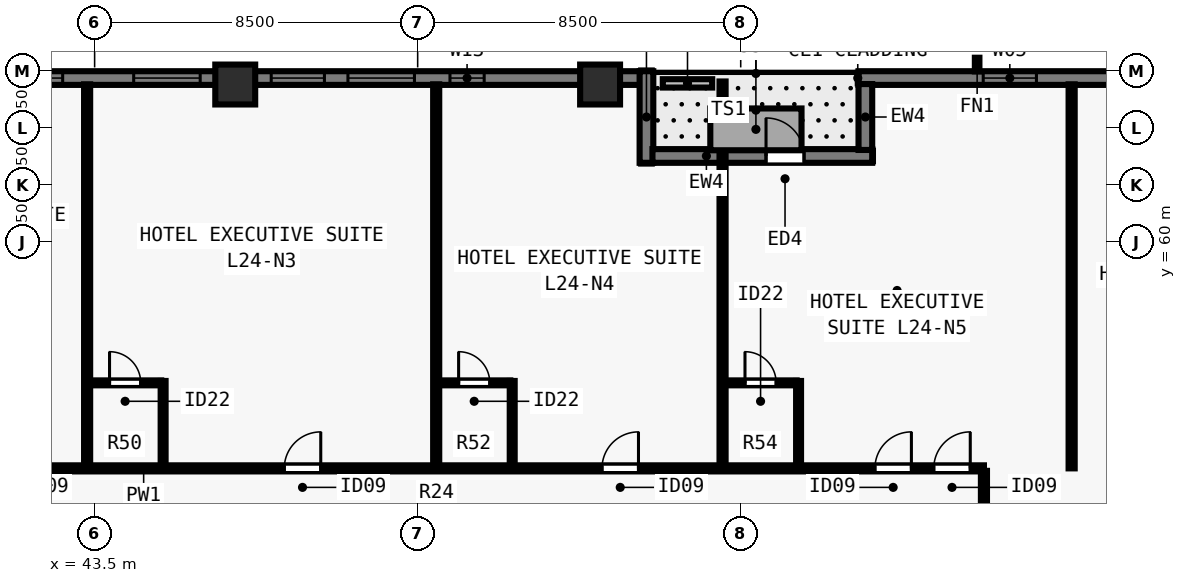
"""IFC4 building model, lengths in metres.
Left out: names, types, materials, properties, quantities, classifications, styles, units other than length and angle.
Written with IfcOpenShell. Run it as: python <this file> out.ifc"""

import sys

from ifc_helpers import new_model, si_unit, direction, frame, frame_2d, origin, origin_2d, place, context, subcontext, project, spatial, rectangle, extrude, element, fill, save


model = new_model("IFC4")
c1 = context("Model", 3, precision=1e-05, world=origin(), true_north=direction((0.0, 1.0)))
c2 = subcontext(c1, "Body", "Model", "MODEL_VIEW")
j1 = project(units=[si_unit("LENGTHUNIT", "METRE"), si_unit("PLANEANGLEUNIT", "RADIAN")], contexts=[c1])
p1 = place(None, origin())
s1 = spatial("IfcSite", under=j1, at=p1, CompositionType="ELEMENT")
p2 = place(p1, origin())
s2 = spatial("IfcBuilding", under=s1, at=p2, CompositionType="ELEMENT")
p3 = place(p2, frame((0.0, 0.0, 90.0)))
s3 = spatial("IfcBuildingStorey", under=s2, at=p3, CompositionType="ELEMENT", Elevation=90.0)
for number, where, z_axis, x_axis in (
    (1, (56.8, 64.15, 0.0), (0.0, 0.0, 1.0), (1.0, 0.0, 0.0)),
    (2, (47.2, 64.15, 0.0), (0.0, 0.0, 1.0), (1.0, 0.0, 0.0)),
):
    element("IfcColumn", number, at=place(p3, frame(where, z_axis=z_axis, x_axis=x_axis)), inside=s3, PredefinedType="COLUMN", context=c2, shape_type="SweptSolid", body=[
        extrude(rectangle(XDim=1.05, YDim=1.05, at=origin_2d()), origin(), (0.0, 0.0, 1.0), 3.5),
    ])
p4 = place(p3, frame((63.6, 64.32, 0.0), z_axis=(0.0, 0.0, 1.0), x_axis=(1.0, 0.0, 0.0)))
e3 = element("IfcWall", 3, at=p4, inside=s3, PredefinedType="SOLIDWALL", context=c2, shape_type="SweptSolid", body=[
    extrude(rectangle(XDim=10.562, YDim=0.36, at=frame_2d((5.281, 0.0))), origin(), (0.0, 0.0, 1.0), 3.28),
])
p5 = place(p4, frame((3.281, 0.0, 0.8)))
e4 = element("IfcOpeningElement", 4, at=p5, cuts=e3, PredefinedType="OPENING", context=c2, shape_type="SweptSolid", body=[
    extrude(rectangle(XDim=1.4, YDim=1.544, at=frame_2d((0.7, 0.772))), frame((0.0, 0.19, 0.0), z_axis=(0.0, -1.0, 0.0), x_axis=(1.0, 0.0, 0.0)), (0.0, 0.0, 1.0), 0.38),
])
p6 = place(p3, frame((29.5, 64.32, 0.0), z_axis=(0.0, 0.0, 1.0), x_axis=(1.0, 0.0, 0.0)))
e5 = element("IfcWall", 5, at=p6, inside=s3, PredefinedType="SOLIDWALL", context=c2, shape_type="SweptSolid", body=[
    extrude(rectangle(XDim=28.362, YDim=0.36, at=frame_2d((14.181, 0.0))), origin(), (0.0, 0.0, 1.0), 3.28),
])
p7 = place(p6, frame((4.422, 0.0, 0.8)))
e6 = element("IfcOpeningElement", 6, at=p7, cuts=e5, PredefinedType="OPENING", context=c2, shape_type="SweptSolid", body=[
    extrude(rectangle(XDim=1.4, YDim=1.544, at=frame_2d((0.7, 0.772))), frame((0.0, 0.19, 0.0), z_axis=(0.0, -1.0, 0.0), x_axis=(1.0, 0.0, 0.0)), (0.0, 0.0, 1.0), 0.38),
])
p8 = place(p6, frame((8.14, 0.0, 0.8)))
e7 = element("IfcOpeningElement", 7, at=p8, cuts=e5, PredefinedType="OPENING", context=c2, shape_type="SweptSolid", body=[
    extrude(rectangle(XDim=1.75, YDim=1.544, at=frame_2d((0.875, 0.772))), frame((0.0, 0.19, 0.0), z_axis=(0.0, -1.0, 0.0), x_axis=(1.0, 0.0, 0.0)), (0.0, 0.0, 1.0), 0.38),
])
p9 = place(p6, frame((11.759, 0.0, 0.8)))
e8 = element("IfcOpeningElement", 8, at=p9, cuts=e5, PredefinedType="OPENING", context=c2, shape_type="SweptSolid", body=[
    extrude(rectangle(XDim=1.4, YDim=1.544, at=frame_2d((0.7, 0.772))), frame((0.0, 0.19, 0.0), z_axis=(0.0, -1.0, 0.0), x_axis=(1.0, 0.0, 0.0)), (0.0, 0.0, 1.0), 0.38),
])
p10 = place(p6, frame((15.028, 0.0, 0.8)))
e9 = element("IfcOpeningElement", 9, at=p10, cuts=e5, PredefinedType="OPENING", context=c2, shape_type="SweptSolid", body=[
    extrude(rectangle(XDim=1.75, YDim=1.544, at=frame_2d((0.875, 0.772))), frame((0.0, 0.19, 0.0), z_axis=(0.0, -1.0, 0.0), x_axis=(1.0, 0.0, 0.0)), (0.0, 0.0, 1.0), 0.38),
])
p11 = place(p6, frame((18.646, 0.0, 0.8)))
e10 = element("IfcOpeningElement", 10, at=p11, cuts=e5, PredefinedType="OPENING", context=c2, shape_type="SweptSolid", body=[
    extrude(rectangle(XDim=1.4, YDim=1.544, at=frame_2d((0.7, 0.772))), frame((0.0, 0.19, 0.0), z_axis=(0.0, -1.0, 0.0), x_axis=(1.0, 0.0, 0.0)), (0.0, 0.0, 1.0), 0.38),
])
p12 = place(p6, frame((20.665, 0.0, 0.8)))
e11 = element("IfcOpeningElement", 11, at=p12, cuts=e5, PredefinedType="OPENING", context=c2, shape_type="SweptSolid", body=[
    extrude(rectangle(XDim=1.75, YDim=1.544, at=frame_2d((0.875, 0.772))), frame((0.0, 0.19, 0.0), z_axis=(0.0, -1.0, 0.0), x_axis=(1.0, 0.0, 0.0)), (0.0, 0.0, 1.0), 0.38),
])
p13 = place(p6, frame((23.35, 0.0, 0.8)))
e12 = element("IfcOpeningElement", 12, at=p13, cuts=e5, PredefinedType="OPENING", context=c2, shape_type="SweptSolid", body=[
    extrude(rectangle(XDim=0.9, YDim=1.544, at=frame_2d((0.45, 0.772))), frame((0.0, 0.19, 0.0), z_axis=(0.0, -1.0, 0.0), x_axis=(1.0, 0.0, 0.0)), (0.0, 0.0, 1.0), 0.38),
])
p14 = place(p3, frame((58.02, 64.5, 0.0), z_axis=(0.0, 0.0, 1.0), x_axis=(0.0, -1.0, 0.0)))
e13 = element("IfcWall", 13, at=p14, inside=s3, PredefinedType="SOLIDWALL", context=c2, shape_type="SweptSolid", body=[
    extrude(rectangle(XDim=2.41, YDim=0.36, at=frame_2d((1.205, 0.0))), origin(), (0.0, 0.0, 1.0), 3.28),
])
p15 = place(p3, frame((58.178, 62.27, 0.0), z_axis=(0.0, 0.0, 1.0), x_axis=(1.0, 0.0, 0.0)))
e14 = element("IfcWall", 14, at=p15, inside=s3, PredefinedType="SOLIDWALL", context=c2, shape_type="SweptSolid", body=[
    extrude(rectangle(XDim=5.782, YDim=0.36, at=frame_2d((2.891, 0.0))), origin(), (0.0, 0.0, 1.0), 3.28),
])
p16 = place(p15, frame((2.988, 0.0, 0.0)))
e15 = element("IfcOpeningElement", 15, at=p16, cuts=e14, PredefinedType="OPENING", context=c2, shape_type="SweptSolid", body=[
    extrude(rectangle(XDim=1.0, YDim=2.15, at=frame_2d((0.5, 1.075))), frame((0.0, 0.19, 0.0), z_axis=(0.0, -1.0, 0.0), x_axis=(1.0, 0.0, 0.0)), (0.0, 0.0, 1.0), 0.38),
])
p17 = place(p3, frame((63.78, 62.428, 0.0), z_axis=(0.0, 0.0, 1.0), x_axis=(0.0, 1.0, 0.0)))
e16 = element("IfcWall", 16, at=p17, inside=s3, PredefinedType="SOLIDWALL", context=c2, shape_type="SweptSolid", body=[
    extrude(rectangle(XDim=1.734, YDim=0.36, at=frame_2d((0.867, 0.0))), origin(), (0.0, 0.0, 1.0), 3.28),
])
p18 = place(p3, frame((58.45, 64.18, 0.0), z_axis=(0.0, 0.0, 1.0), x_axis=(1.0, 0.0, 0.0)))
e17 = element("IfcWall", 17, at=p18, inside=s3, PredefinedType="PARAPET", context=c2, shape_type="SweptSolid", body=[
    extrude(rectangle(XDim=1.3, YDim=0.22, at=frame_2d((0.65, 0.0))), origin(), (0.0, 0.0, 1.0), 0.55),
])
p19 = place(p3, frame((37.1, 54.05, 0.0), z_axis=(0.0, 0.0, 1.0), x_axis=(1.0, 0.0, 0.0)))
e18 = element("IfcWall", 18, at=p19, inside=s3, PredefinedType="PARTITIONING", context=c2, shape_type="SweptSolid", body=[
    extrude(rectangle(XDim=29.8, YDim=0.16, at=frame_2d((14.9, 0.0))), origin(), (0.0, 0.0, 1.0), 3.28),
])
p20 = place(p19, frame((0.91, 0.0, 0.0)))
e19 = element("IfcOpeningElement", 19, at=p20, cuts=e18, PredefinedType="OPENING", context=c2, shape_type="SweptSolid", body=[
    extrude(rectangle(XDim=0.96, YDim=2.15, at=frame_2d((0.48, 1.075))), frame((0.0, 0.09, 0.0), z_axis=(0.0, -1.0, 0.0), x_axis=(1.0, 0.0, 0.0)), (0.0, 0.0, 1.0), 0.18),
])
p21 = place(p19, frame((3.03, 0.0, 0.0)))
e20 = element("IfcOpeningElement", 20, at=p21, cuts=e18, PredefinedType="OPENING", context=c2, shape_type="SweptSolid", body=[
    extrude(rectangle(XDim=0.96, YDim=2.15, at=frame_2d((0.48, 1.075))), frame((0.0, 0.09, 0.0), z_axis=(0.0, -1.0, 0.0), x_axis=(1.0, 0.0, 0.0)), (0.0, 0.0, 1.0), 0.18),
])
p22 = place(p19, frame((11.39, 0.0, 0.0)))
e21 = element("IfcOpeningElement", 21, at=p22, cuts=e18, PredefinedType="OPENING", context=c2, shape_type="SweptSolid", body=[
    extrude(rectangle(XDim=0.96, YDim=2.15, at=frame_2d((0.48, 1.075))), frame((0.0, 0.09, 0.0), z_axis=(0.0, -1.0, 0.0), x_axis=(1.0, 0.0, 0.0)), (0.0, 0.0, 1.0), 0.18),
])
p23 = place(p19, frame((19.75, 0.0, 0.0)))
e22 = element("IfcOpeningElement", 22, at=p23, cuts=e18, PredefinedType="OPENING", context=c2, shape_type="SweptSolid", body=[
    extrude(rectangle(XDim=0.96, YDim=2.15, at=frame_2d((0.48, 1.075))), frame((0.0, 0.09, 0.0), z_axis=(0.0, -1.0, 0.0), x_axis=(1.0, 0.0, 0.0)), (0.0, 0.0, 1.0), 0.18),
])
p24 = place(p19, frame((26.931, 0.0, 0.0)))
e23 = element("IfcOpeningElement", 23, at=p24, cuts=e18, PredefinedType="OPENING", context=c2, shape_type="SweptSolid", body=[
    extrude(rectangle(XDim=0.96, YDim=2.15, at=frame_2d((0.48, 1.075))), frame((0.0, 0.09, 0.0), z_axis=(0.0, -1.0, 0.0), x_axis=(1.0, 0.0, 0.0)), (0.0, 0.0, 1.0), 0.18),
])
p25 = place(p19, frame((28.48, 0.0, 0.0)))
e24 = element("IfcOpeningElement", 24, at=p25, cuts=e18, PredefinedType="OPENING", context=c2, shape_type="SweptSolid", body=[
    extrude(rectangle(XDim=0.96, YDim=2.15, at=frame_2d((0.48, 1.075))), frame((0.0, 0.09, 0.0), z_axis=(0.0, -1.0, 0.0), x_axis=(1.0, 0.0, 0.0)), (0.0, 0.0, 1.0), 0.18),
])
p26 = place(p3, frame((66.9, 24.015, 0.0), z_axis=(0.0, 0.0, 1.0), x_axis=(0.0, 1.0, 0.0)))
e25 = element("IfcWall", 25, at=p26, inside=s3, PredefinedType="PARTITIONING", context=c2, shape_type="SweptSolid", body=[
    extrude(rectangle(XDim=29.97, YDim=0.16, at=frame_2d((14.985, 0.0))), origin(), (0.0, 0.0, 1.0), 3.28),
])
p27 = place(p26, frame((3.911, 0.0, 0.0)))
e26 = element("IfcOpeningElement", 26, at=p27, cuts=e25, PredefinedType="OPENING", context=c2, shape_type="SweptSolid", body=[
    extrude(rectangle(XDim=0.96, YDim=2.15, at=frame_2d((0.48, 1.075))), frame((0.0, 0.09, 0.0), z_axis=(0.0, -1.0, 0.0), x_axis=(1.0, 0.0, 0.0)), (0.0, 0.0, 1.0), 0.18),
])
p28 = place(p26, frame((9.544, 0.0, 0.0)))
e27 = element("IfcOpeningElement", 27, at=p28, cuts=e25, PredefinedType="OPENING", context=c2, shape_type="SweptSolid", body=[
    extrude(rectangle(XDim=0.96, YDim=2.15, at=frame_2d((0.48, 1.075))), frame((0.0, 0.09, 0.0), z_axis=(0.0, -1.0, 0.0), x_axis=(1.0, 0.0, 0.0)), (0.0, 0.0, 1.0), 0.18),
])
p29 = place(p26, frame((15.625, 0.0, 0.0)))
e28 = element("IfcOpeningElement", 28, at=p29, cuts=e25, PredefinedType="OPENING", context=c2, shape_type="SweptSolid", body=[
    extrude(rectangle(XDim=0.96, YDim=2.15, at=frame_2d((0.48, 1.075))), frame((0.0, 0.09, 0.0), z_axis=(0.0, -1.0, 0.0), x_axis=(1.0, 0.0, 0.0)), (0.0, 0.0, 1.0), 0.18),
])
p30 = place(p26, frame((21.584, 0.0, 0.0)))
e29 = element("IfcOpeningElement", 29, at=p30, cuts=e25, PredefinedType="OPENING", context=c2, shape_type="SweptSolid", body=[
    extrude(rectangle(XDim=0.96, YDim=2.15, at=frame_2d((0.48, 1.075))), frame((0.0, 0.09, 0.0), z_axis=(0.0, -1.0, 0.0), x_axis=(1.0, 0.0, 0.0)), (0.0, 0.0, 1.0), 0.18),
])
p31 = place(p26, frame((27.494, 0.0, 0.0)))
e30 = element("IfcOpeningElement", 30, at=p31, cuts=e25, PredefinedType="OPENING", context=c2, shape_type="SweptSolid", body=[
    extrude(rectangle(XDim=0.96, YDim=2.15, at=frame_2d((0.48, 1.075))), frame((0.0, 0.09, 0.0), z_axis=(0.0, -1.0, 0.0), x_axis=(1.0, 0.0, 0.0)), (0.0, 0.0, 1.0), 0.18),
])
p32 = place(p3, frame((43.302, 54.115, 0.0), z_axis=(0.0, 0.0, 1.0), x_axis=(0.0, 1.0, 0.0)))
e31 = element("IfcWall", 31, at=p32, inside=s3, PredefinedType="PARTITIONING", context=c2, shape_type="SweptSolid", body=[
    extrude(rectangle(XDim=10.04, YDim=0.16, at=frame_2d((5.02, 0.0))), origin(), (0.0, 0.0, 1.0), 3.28),
])
p33 = place(p3, frame((45.302, 54.115, 0.0), z_axis=(0.0, 0.0, 1.0), x_axis=(0.0, 1.0, 0.0)))
e32 = element("IfcWall", 32, at=p33, inside=s3, PredefinedType="PLUMBINGWALL", context=c2, shape_type="SweptSolid", body=[
    extrude(rectangle(XDim=2.235, YDim=0.13, at=frame_2d((1.118, 0.0))), origin(), (0.0, 0.0, 1.0), 3.28),
])
p34 = place(p3, frame((43.367, 56.3, 0.0), z_axis=(0.0, 0.0, 1.0), x_axis=(1.0, 0.0, 0.0)))
e33 = element("IfcWall", 33, at=p34, inside=s3, PredefinedType="PLUMBINGWALL", context=c2, shape_type="SweptSolid", body=[
    extrude(rectangle(XDim=1.885, YDim=0.13, at=frame_2d((0.942, 0.0))), origin(), (0.0, 0.0, 1.0), 3.28),
])
p35 = place(p34, frame((0.525, 0.0, 0.0)))
e34 = element("IfcOpeningElement", 34, at=p35, cuts=e33, PredefinedType="OPENING", context=c2, shape_type="SweptSolid", body=[
    extrude(rectangle(XDim=0.82, YDim=2.1, at=frame_2d((0.41, 1.05))), frame((0.0, 0.075, 0.0), z_axis=(0.0, -1.0, 0.0), x_axis=(1.0, 0.0, 0.0)), (0.0, 0.0, 1.0), 0.15),
])
p36 = place(p3, frame((52.488, 54.115, 0.0), z_axis=(0.0, 0.0, 1.0), x_axis=(0.0, 1.0, 0.0)))
e35 = element("IfcWall", 35, at=p36, inside=s3, PredefinedType="PARTITIONING", context=c2, shape_type="SweptSolid", body=[
    extrude(rectangle(XDim=10.04, YDim=0.16, at=frame_2d((5.02, 0.0))), origin(), (0.0, 0.0, 1.0), 2.849),
])
p37 = place(p3, frame((54.488, 54.115, 0.0), z_axis=(0.0, 0.0, 1.0), x_axis=(0.0, 1.0, 0.0)))
e36 = element("IfcWall", 36, at=p37, inside=s3, PredefinedType="PLUMBINGWALL", context=c2, shape_type="SweptSolid", body=[
    extrude(rectangle(XDim=2.235, YDim=0.13, at=frame_2d((1.118, 0.0))), origin(), (0.0, 0.0, 1.0), 3.28),
])
p38 = place(p3, frame((52.552, 56.3, 0.0), z_axis=(0.0, 0.0, 1.0), x_axis=(1.0, 0.0, 0.0)))
e37 = element("IfcWall", 37, at=p38, inside=s3, PredefinedType="PLUMBINGWALL", context=c2, shape_type="SweptSolid", body=[
    extrude(rectangle(XDim=1.885, YDim=0.13, at=frame_2d((0.942, 0.0))), origin(), (0.0, 0.0, 1.0), 3.28),
])
p39 = place(p38, frame((0.525, 0.0, 0.0)))
e38 = element("IfcOpeningElement", 38, at=p39, cuts=e37, PredefinedType="OPENING", context=c2, shape_type="SweptSolid", body=[
    extrude(rectangle(XDim=0.82, YDim=2.1, at=frame_2d((0.41, 1.05))), frame((0.0, 0.075, 0.0), z_axis=(0.0, -1.0, 0.0), x_axis=(1.0, 0.0, 0.0)), (0.0, 0.0, 1.0), 0.15),
])
p40 = place(p3, frame((60.022, 54.115, 0.0), z_axis=(0.0, 0.0, 1.0), x_axis=(0.0, 1.0, 0.0)))
e39 = element("IfcWall", 39, at=p40, inside=s3, PredefinedType="PARTITIONING", context=c2, shape_type="SweptSolid", body=[
    extrude(rectangle(XDim=10.115, YDim=0.16, at=frame_2d((5.058, 0.0))), origin(), (0.0, 0.0, 1.0), 3.28),
])
p41 = place(p3, frame((62.022, 54.115, 0.0), z_axis=(0.0, 0.0, 1.0), x_axis=(0.0, 1.0, 0.0)))
e40 = element("IfcWall", 40, at=p41, inside=s3, PredefinedType="PLUMBINGWALL", context=c2, shape_type="SweptSolid", body=[
    extrude(rectangle(XDim=2.235, YDim=0.13, at=frame_2d((1.118, 0.0))), origin(), (0.0, 0.0, 1.0), 3.28),
])
p42 = place(p3, frame((60.087, 56.3, 0.0), z_axis=(0.0, 0.0, 1.0), x_axis=(1.0, 0.0, 0.0)))
e41 = element("IfcWall", 41, at=p42, inside=s3, PredefinedType="PLUMBINGWALL", context=c2, shape_type="SweptSolid", body=[
    extrude(rectangle(XDim=1.885, YDim=0.13, at=frame_2d((0.942, 0.0))), origin(), (0.0, 0.0, 1.0), 3.28),
])
p43 = place(p42, frame((0.525, 0.0, 0.0)))
e42 = element("IfcOpeningElement", 42, at=p43, cuts=e41, PredefinedType="OPENING", context=c2, shape_type="SweptSolid", body=[
    extrude(rectangle(XDim=0.82, YDim=2.1, at=frame_2d((0.41, 1.05))), frame((0.0, 0.075, 0.0), z_axis=(0.0, -1.0, 0.0), x_axis=(1.0, 0.0, 0.0)), (0.0, 0.0, 1.0), 0.15),
])
p44 = place(p3, frame((69.208, 54.05, 0.0), z_axis=(0.0, 0.0, 1.0), x_axis=(0.0, 1.0, 0.0)))
e43 = element("IfcWall", 43, at=p44, inside=s3, PredefinedType="PARTITIONING", context=c2, shape_type="SweptSolid", body=[
    extrude(rectangle(XDim=10.105, YDim=0.16, at=frame_2d((5.052, 0.0))), origin(), (0.0, 0.0, 1.0), 2.439),
])
p45 = place(p5, origin())
e44 = element("IfcWindow", 44, at=p45, inside=s3, PartitioningType="SINGLE_PANEL", PredefinedType="WINDOW", context=c2, shape_type="SweptSolid", body=[
    extrude(rectangle(XDim=1.4, YDim=1.544, at=frame_2d((0.7, 0.772))), frame((0.0, -0.05, 0.0), z_axis=(0.0, -1.0, 0.0), x_axis=(1.0, 0.0, 0.0)), (0.0, 0.0, 1.0), 0.06),
])
fill(e4, e44)
p46 = place(p9, origin())
e45 = element("IfcWindow", 45, at=p46, inside=s3, PartitioningType="SINGLE_PANEL", PredefinedType="WINDOW", context=c2, shape_type="SweptSolid", body=[
    extrude(rectangle(XDim=1.4, YDim=1.544, at=frame_2d((0.7, 0.772))), frame((0.0, -0.05, 0.0), z_axis=(0.0, -1.0, 0.0), x_axis=(1.0, 0.0, 0.0)), (0.0, 0.0, 1.0), 0.06),
])
fill(e8, e45)
p47 = place(p10, origin())
e46 = element("IfcWindow", 46, at=p47, inside=s3, PartitioningType="SINGLE_PANEL", PredefinedType="WINDOW", context=c2, shape_type="SweptSolid", body=[
    extrude(rectangle(XDim=1.75, YDim=1.544, at=frame_2d((0.875, 0.772))), frame((0.0, -0.05, 0.0), z_axis=(0.0, -1.0, 0.0), x_axis=(1.0, 0.0, 0.0)), (0.0, 0.0, 1.0), 0.06),
])
fill(e9, e46)
p48 = place(p11, origin())
e47 = element("IfcWindow", 47, at=p48, inside=s3, PartitioningType="SINGLE_PANEL", PredefinedType="WINDOW", context=c2, shape_type="SweptSolid", body=[
    extrude(rectangle(XDim=1.4, YDim=1.544, at=frame_2d((0.7, 0.772))), frame((0.0, -0.05, 0.0), z_axis=(0.0, -1.0, 0.0), x_axis=(1.0, 0.0, 0.0)), (0.0, 0.0, 1.0), 0.06),
])
fill(e10, e47)
p49 = place(p12, origin())
e48 = element("IfcWindow", 48, at=p49, inside=s3, PartitioningType="SINGLE_PANEL", PredefinedType="WINDOW", context=c2, shape_type="SweptSolid", body=[
    extrude(rectangle(XDim=1.75, YDim=1.544, at=frame_2d((0.875, 0.772))), frame((0.0, -0.05, 0.0), z_axis=(0.0, -1.0, 0.0), x_axis=(1.0, 0.0, 0.0)), (0.0, 0.0, 1.0), 0.06),
])
fill(e11, e48)
p50 = place(p16, origin())
e49 = element("IfcDoor", 49, at=p50, inside=s3, OperationType="SINGLE_SWING_LEFT", PredefinedType="DOOR", context=c2, shape_type="SweptSolid", body=[
    extrude(rectangle(XDim=1.0, YDim=2.15, at=frame_2d((0.5, 1.075))), frame((0.0, 0.025, 0.0), z_axis=(0.0, -1.0, 0.0), x_axis=(1.0, 0.0, 0.0)), (0.0, 0.0, 1.0), 0.05),
])
fill(e15, e49)
p51 = place(p13, origin())
e50 = element("IfcWindow", 50, at=p51, inside=s3, PartitioningType="SINGLE_PANEL", PredefinedType="WINDOW", context=c2, shape_type="SweptSolid", body=[
    extrude(rectangle(XDim=0.9, YDim=1.544, at=frame_2d((0.45, 0.772))), frame((0.0, -0.04, 0.0), z_axis=(0.0, -1.0, 0.0), x_axis=(1.0, 0.0, 0.0)), (0.0, 0.0, 1.0), 0.06),
])
fill(e12, e50)
p52 = place(p35, origin())
e51 = element("IfcDoor", 51, at=p52, inside=s3, OperationType="SINGLE_SWING_LEFT", PredefinedType="DOOR", context=c2, shape_type="SweptSolid", body=[
    extrude(rectangle(XDim=0.82, YDim=2.1, at=frame_2d((0.41, 1.05))), frame((0.0, 0.025, 0.0), z_axis=(0.0, -1.0, 0.0), x_axis=(1.0, 0.0, 0.0)), (0.0, 0.0, 1.0), 0.05),
])
fill(e34, e51)
p53 = place(p22, origin())
e52 = element("IfcDoor", 52, at=p53, inside=s3, OperationType="SINGLE_SWING_RIGHT", PredefinedType="DOOR", context=c2, shape_type="SweptSolid", body=[
    extrude(rectangle(XDim=0.96, YDim=2.15, at=frame_2d((0.48, 1.075))), frame((0.0, 0.025, 0.0), z_axis=(0.0, -1.0, 0.0), x_axis=(1.0, 0.0, 0.0)), (0.0, 0.0, 1.0), 0.05),
])
fill(e21, e52)
p54 = place(p39, origin())
e53 = element("IfcDoor", 53, at=p54, inside=s3, OperationType="SINGLE_SWING_LEFT", PredefinedType="DOOR", context=c2, shape_type="SweptSolid", body=[
    extrude(rectangle(XDim=0.82, YDim=2.1, at=frame_2d((0.41, 1.05))), frame((0.0, 0.025, 0.0), z_axis=(0.0, -1.0, 0.0), x_axis=(1.0, 0.0, 0.0)), (0.0, 0.0, 1.0), 0.05),
])
fill(e38, e53)
p55 = place(p23, origin())
e54 = element("IfcDoor", 54, at=p55, inside=s3, OperationType="SINGLE_SWING_RIGHT", PredefinedType="DOOR", context=c2, shape_type="SweptSolid", body=[
    extrude(rectangle(XDim=0.96, YDim=2.15, at=frame_2d((0.48, 1.075))), frame((0.0, 0.025, 0.0), z_axis=(0.0, -1.0, 0.0), x_axis=(1.0, 0.0, 0.0)), (0.0, 0.0, 1.0), 0.05),
])
fill(e22, e54)
p56 = place(p43, origin())
e55 = element("IfcDoor", 55, at=p56, inside=s3, OperationType="SINGLE_SWING_LEFT", PredefinedType="DOOR", context=c2, shape_type="SweptSolid", body=[
    extrude(rectangle(XDim=0.82, YDim=2.1, at=frame_2d((0.41, 1.05))), frame((0.0, 0.025, 0.0), z_axis=(0.0, -1.0, 0.0), x_axis=(1.0, 0.0, 0.0)), (0.0, 0.0, 1.0), 0.05),
])
fill(e42, e55)
p57 = place(p24, origin())
e56 = element("IfcDoor", 56, at=p57, inside=s3, OperationType="SINGLE_SWING_RIGHT", PredefinedType="DOOR", context=c2, shape_type="SweptSolid", body=[
    extrude(rectangle(XDim=0.96, YDim=2.15, at=frame_2d((0.48, 1.075))), frame((0.0, 0.025, 0.0), z_axis=(0.0, -1.0, 0.0), x_axis=(1.0, 0.0, 0.0)), (0.0, 0.0, 1.0), 0.05),
])
fill(e23, e56)
p58 = place(p25, origin())
e57 = element("IfcDoor", 57, at=p58, inside=s3, OperationType="SINGLE_SWING_RIGHT", PredefinedType="DOOR", context=c2, shape_type="SweptSolid", body=[
    extrude(rectangle(XDim=0.96, YDim=2.15, at=frame_2d((0.48, 1.075))), frame((0.0, 0.025, 0.0), z_axis=(0.0, -1.0, 0.0), x_axis=(1.0, 0.0, 0.0)), (0.0, 0.0, 1.0), 0.05),
])
fill(e24, e57)
save(model, sys.argv[1])
